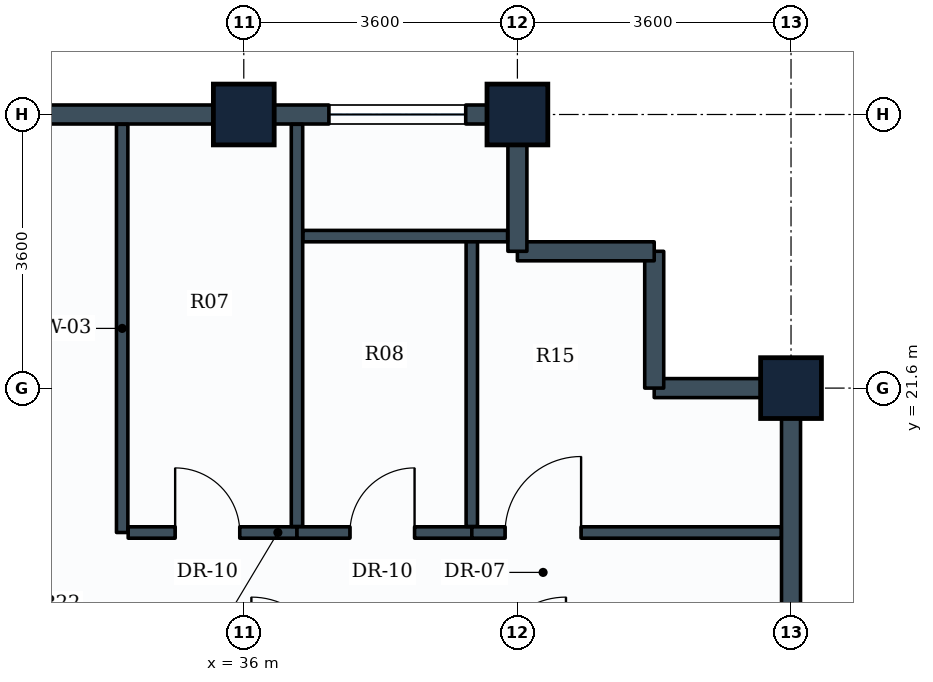
"""IFC4 building model, lengths in metres.
Left out: names, types, materials, properties, quantities, classifications, styles, units other than length and angle.
Written with IfcOpenShell. Run it as: python <this file> out.ifc"""

import sys

from ifc_helpers import new_model, si_unit, direction, frame, frame_2d, origin, origin_2d, place, context, subcontext, project, spatial, rectangle, extrude, element, fill, save


model = new_model("IFC4")
c1 = context("Model", 3, precision=1e-05, world=origin(), true_north=direction((0.0, 1.0)))
c2 = subcontext(c1, "Body", "Model", "MODEL_VIEW")
j1 = project(units=[si_unit("LENGTHUNIT", "METRE"), si_unit("PLANEANGLEUNIT", "RADIAN")], contexts=[c1])
p1 = place(None, origin())
s1 = spatial("IfcSite", under=j1, at=p1, CompositionType="ELEMENT")
p2 = place(p1, origin())
s2 = spatial("IfcBuilding", under=s1, at=p2, CompositionType="ELEMENT")
p3 = place(p2, frame((0.0, 0.0, 273.8)))
s3 = spatial("IfcBuildingStorey", under=s2, at=p3, CompositionType="ELEMENT", Elevation=273.8)
for number, where, z_axis, x_axis in (
    (1, (36.0, 25.2, 0.0), (0.0, 0.0, 1.0), (1.0, 0.0, 0.0)),
    (2, (39.6, 25.2, 0.0), (0.0, 0.0, 1.0), (1.0, 0.0, 0.0)),
    (3, (43.2, 21.6, 0.0), (0.0, 0.0, 1.0), (0.0, 1.0, 0.0)),
):
    element("IfcColumn", number, at=place(p3, frame(where, z_axis=z_axis, x_axis=x_axis)), inside=s3, PredefinedType="COLUMN", context=c2, shape_type="SweptSolid", body=[
        extrude(rectangle(XDim=0.8, YDim=0.8, at=origin_2d()), origin(), (0.0, 0.0, 1.0), 3.6),
    ])
p4 = place(p3, frame((43.2, 21.6, 0.0), z_axis=(0.0, 0.0, 1.0), x_axis=(0.0, -1.0, 0.0)))
e4 = element("IfcWall", 4, at=p4, inside=s3, PredefinedType="STANDARD", context=c2, shape_type="SweptSolid", body=[
    extrude(rectangle(XDim=3.6, YDim=0.25, at=frame_2d((1.8, 0.0))), origin(), (0.0, 0.0, 1.0), 2.83),
])
p5 = place(p3, frame((41.4, 21.6, 0.0), z_axis=(0.0, 0.0, 1.0), x_axis=(1.0, 0.0, 0.0)))
e5 = element("IfcWall", 5, at=p5, inside=s3, PredefinedType="STANDARD", context=c2, shape_type="SweptSolid", body=[
    extrude(rectangle(XDim=1.8, YDim=0.25, at=frame_2d((0.9, 0.0))), origin(), (0.0, 0.0, 1.0), 2.83),
])
for number, where, z_axis, x_axis in (
    (6, (41.4, 23.4, 0.0), (0.0, 0.0, 1.0), (0.0, -1.0, 0.0)),
    (7, (39.6, 23.4, 0.0), (0.0, 0.0, 1.0), (1.0, 0.0, 0.0)),
):
    element("IfcWall", number, at=place(p3, frame(where, z_axis=z_axis, x_axis=x_axis)), inside=s3, PredefinedType="STANDARD", context=c2, shape_type="SweptSolid", body=[
        extrude(rectangle(XDim=1.8, YDim=0.25, at=frame_2d((0.9, 0.0))), origin(), (0.0, 0.0, 1.0), 3.335),
    ])
p6 = place(p3, frame((39.6, 25.2, 0.0), z_axis=(0.0, 0.0, 1.0), x_axis=(0.0, -1.0, 0.0)))
e8 = element("IfcWall", 8, at=p6, inside=s3, PredefinedType="STANDARD", context=c2, shape_type="SweptSolid", body=[
    extrude(rectangle(XDim=1.8, YDim=0.25, at=frame_2d((0.9, 0.0))), origin(), (0.0, 0.0, 1.0), 2.83),
])
p7 = place(p3, frame((36.0, 25.2, 0.0), z_axis=(0.0, 0.0, 1.0), x_axis=(1.0, 0.0, 0.0)))
e9 = element("IfcWall", 9, at=p7, inside=s3, PredefinedType="STANDARD", context=c2, shape_type="SweptSolid", body=[
    extrude(rectangle(XDim=3.6, YDim=0.25, at=frame_2d((1.8, 0.0))), origin(), (0.0, 0.0, 1.0), 2.83),
])
p8 = place(p7, frame((1.12, 0.0, 0.85)))
e10 = element("IfcOpeningElement", 10, at=p8, cuts=e9, PredefinedType="OPENING", context=c2, shape_type="SweptSolid", body=[
    extrude(rectangle(XDim=1.8, YDim=1.35, at=frame_2d((0.9, 0.675))), frame((0.0, 0.135, 0.0), z_axis=(0.0, -1.0, 0.0), x_axis=(1.0, 0.0, 0.0)), (0.0, 0.0, 1.0), 0.27),
])
p9 = place(p3, frame((32.4, 25.2, 0.0), z_axis=(0.0, 0.0, 1.0), x_axis=(1.0, 0.0, 0.0)))
e11 = element("IfcWall", 11, at=p9, inside=s3, PredefinedType="STANDARD", context=c2, shape_type="SweptSolid", body=[
    extrude(rectangle(XDim=3.6, YDim=0.25, at=frame_2d((1.8, 0.0))), origin(), (0.0, 0.0, 1.0), 2.83),
])
p10 = place(p3, frame((34.4, 19.7, 0.0), z_axis=(0.0, 0.0, 1.0), x_axis=(0.0, 1.0, 0.0)))
e12 = element("IfcWall", 12, at=p10, inside=s3, PredefinedType="PARTITIONING", context=c2, shape_type="SweptSolid", body=[
    extrude(rectangle(XDim=5.371, YDim=0.15, at=frame_2d((2.686, 0.0))), origin(), (0.0, 0.0, 1.0), 2.83),
])
p11 = place(p3, frame((34.479, 19.7, 0.0), z_axis=(0.0, 0.0, 1.0), x_axis=(1.0, 0.0, 0.0)))
e13 = element("IfcWall", 13, at=p11, inside=s3, PredefinedType="PARTITIONING", context=c2, shape_type="SweptSolid", body=[
    extrude(rectangle(XDim=2.221, YDim=0.15, at=frame_2d((1.11, 0.0))), origin(), (0.0, 0.0, 1.0), 3.02),
])
p12 = place(p11, frame((0.618, 0.0, 0.0)))
e14 = element("IfcOpeningElement", 14, at=p12, cuts=e13, PredefinedType="OPENING", context=c2, shape_type="SweptSolid", body=[
    extrude(rectangle(XDim=0.85, YDim=2.1, at=frame_2d((0.425, 1.05))), frame((0.0, 0.085, 0.0), z_axis=(0.0, -1.0, 0.0), x_axis=(1.0, 0.0, 0.0)), (0.0, 0.0, 1.0), 0.17),
])
p13 = place(p3, frame((36.7, 19.779, 0.0), z_axis=(0.0, 0.0, 1.0), x_axis=(0.0, 1.0, 0.0)))
e15 = element("IfcWall", 15, at=p13, inside=s3, PredefinedType="PARTITIONING", context=c2, shape_type="SweptSolid", body=[
    extrude(rectangle(XDim=5.292, YDim=0.15, at=frame_2d((2.646, 0.0))), origin(), (0.0, 0.0, 1.0), 2.83),
])
p14 = place(p3, frame((36.7, 19.7, 0.0), z_axis=(0.0, 0.0, 1.0), x_axis=(1.0, 0.0, 0.0)))
e16 = element("IfcWall", 16, at=p14, inside=s3, PredefinedType="PARTITIONING", context=c2, shape_type="SweptSolid", body=[
    extrude(rectangle(XDim=2.3, YDim=0.15, at=frame_2d((1.15, 0.0))), origin(), (0.0, 0.0, 1.0), 3.335),
])
p15 = place(p14, frame((0.697, 0.0, 0.0)))
e17 = element("IfcOpeningElement", 17, at=p15, cuts=e16, PredefinedType="OPENING", context=c2, shape_type="SweptSolid", body=[
    extrude(rectangle(XDim=0.85, YDim=2.1, at=frame_2d((0.425, 1.05))), frame((0.0, 0.085, 0.0), z_axis=(0.0, -1.0, 0.0), x_axis=(1.0, 0.0, 0.0)), (0.0, 0.0, 1.0), 0.17),
])
p16 = place(p3, frame((39.0, 19.779, 0.0), z_axis=(0.0, 0.0, 1.0), x_axis=(0.0, 1.0, 0.0)))
e18 = element("IfcWall", 18, at=p16, inside=s3, PredefinedType="PARTITIONING", context=c2, shape_type="SweptSolid", body=[
    extrude(rectangle(XDim=3.821, YDim=0.15, at=frame_2d((1.911, 0.0))), origin(), (0.0, 0.0, 1.0), 3.335),
])
p17 = place(p3, frame((36.779, 23.6, 0.0), z_axis=(0.0, 0.0, 1.0), x_axis=(1.0, 0.0, 0.0)))
e19 = element("IfcWall", 19, at=p17, inside=s3, PredefinedType="PARTITIONING", context=c2, shape_type="SweptSolid", body=[
    extrude(rectangle(XDim=2.692, YDim=0.15, at=frame_2d((1.346, 0.0))), origin(), (0.0, 0.0, 1.0), 3.335),
])
p18 = place(p3, frame((39.0, 19.7, 0.0), z_axis=(0.0, 0.0, 1.0), x_axis=(1.0, 0.0, 0.0)))
e20 = element("IfcWall", 20, at=p18, inside=s3, PredefinedType="PARTITIONING", context=c2, shape_type="SweptSolid", body=[
    extrude(rectangle(XDim=4.071, YDim=0.15, at=frame_2d((2.036, 0.0))), origin(), (0.0, 0.0, 1.0), 2.83),
])
p19 = place(p18, frame((0.438, 0.0, 0.0)))
e21 = element("IfcOpeningElement", 21, at=p19, cuts=e20, PredefinedType="OPENING", context=c2, shape_type="SweptSolid", body=[
    extrude(rectangle(XDim=1.0, YDim=2.1, at=frame_2d((0.5, 1.05))), frame((0.0, 0.085, 0.0), z_axis=(0.0, -1.0, 0.0), x_axis=(1.0, 0.0, 0.0)), (0.0, 0.0, 1.0), 0.17),
])
p20 = place(p8, origin())
e22 = element("IfcWindow", 22, at=p20, inside=s3, PartitioningType="SINGLE_PANEL", PredefinedType="WINDOW", context=c2, shape_type="SweptSolid", body=[
    extrude(rectangle(XDim=1.8, YDim=1.35, at=frame_2d((0.9, 0.675))), frame((0.0, 0.03, 0.0), z_axis=(0.0, -1.0, 0.0), x_axis=(1.0, 0.0, 0.0)), (0.0, 0.0, 1.0), 0.06),
])
fill(e10, e22)
p21 = place(p12, origin())
e23 = element("IfcDoor", 23, at=p21, inside=s3, OperationType="SINGLE_SWING_LEFT", PredefinedType="DOOR", context=c2, shape_type="SweptSolid", body=[
    extrude(rectangle(XDim=0.85, YDim=2.1, at=frame_2d((0.425, 1.05))), frame((0.0, 0.025, 0.0), z_axis=(0.0, -1.0, 0.0), x_axis=(1.0, 0.0, 0.0)), (0.0, 0.0, 1.0), 0.05),
])
fill(e14, e23)
p22 = place(p15, origin())
e24 = element("IfcDoor", 24, at=p22, inside=s3, OperationType="SINGLE_SWING_RIGHT", PredefinedType="DOOR", context=c2, shape_type="SweptSolid", body=[
    extrude(rectangle(XDim=0.85, YDim=2.1, at=frame_2d((0.425, 1.05))), frame((0.0, 0.025, 0.0), z_axis=(0.0, -1.0, 0.0), x_axis=(1.0, 0.0, 0.0)), (0.0, 0.0, 1.0), 0.05),
])
fill(e17, e24)
p23 = place(p19, origin())
e25 = element("IfcDoor", 25, at=p23, inside=s3, OperationType="SINGLE_SWING_RIGHT", PredefinedType="DOOR", context=c2, shape_type="SweptSolid", body=[
    extrude(rectangle(XDim=1.0, YDim=2.1, at=frame_2d((0.5, 1.05))), frame((0.0, 0.025, 0.0), z_axis=(0.0, -1.0, 0.0), x_axis=(1.0, 0.0, 0.0)), (0.0, 0.0, 1.0), 0.05),
])
fill(e21, e25)
save(model, sys.argv[1])
